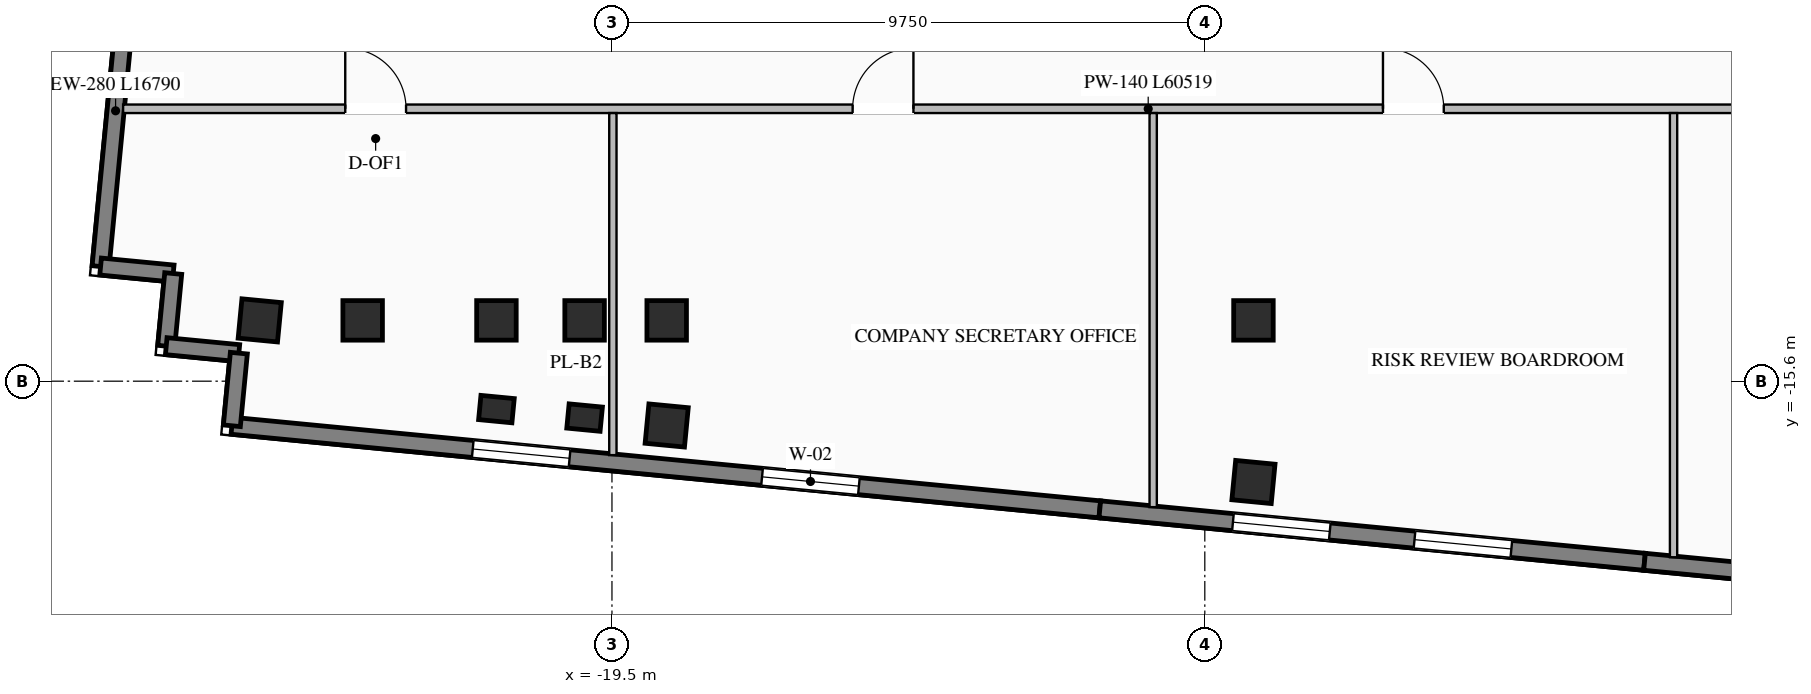
"""IFC4 building model, lengths in metres.
Left out: names, types, materials, properties, quantities, classifications, styles, units other than length and angle.
Written with IfcOpenShell. Run it as: python <this file> out.ifc"""

import sys

from ifc_helpers import new_model, si_unit, direction, frame, frame_2d, origin, origin_2d, place, context, subcontext, project, spatial, rectangle, i_section, extrude, element, fill, save


model = new_model("IFC4")
c1 = context("Model", 3, precision=1e-05, world=origin(), true_north=direction((0.0, 1.0)))
c2 = subcontext(c1, "Body", "Model", "MODEL_VIEW")
j1 = project(units=[si_unit("LENGTHUNIT", "METRE"), si_unit("PLANEANGLEUNIT", "RADIAN")], contexts=[c1])
p1 = place(None, origin())
s1 = spatial("IfcSite", under=j1, at=p1, CompositionType="ELEMENT")
p2 = place(p1, origin())
s2 = spatial("IfcBuilding", under=s1, at=p2, CompositionType="ELEMENT")
p3 = place(p2, frame((0.0, 0.0, 170.75)))
s3 = spatial("IfcBuildingStorey", under=s2, at=p3, CompositionType="ELEMENT", Elevation=170.75)
for number, where, z_axis, x_axis in (
    (1, (-21.4, -14.6, 0.0), (0.0, 0.0, 1.0), (1.0, 0.0, 0.0)),
    (2, (-19.95, -14.6, 0.0), (0.0, 0.0, 1.0), (1.0, 0.0, 0.0)),
    (3, (-18.6, -14.6, 0.0), (0.0, 0.0, 1.0), (1.0, 0.0, 0.0)),
    (4, (-8.95, -14.6, 0.0), (0.0, 0.0, 1.0), (1.0, 0.0, 0.0)),
    (5, (-23.6, -14.6, 0.0), (0.0, 0.0, 1.0), (1.0, 0.0, 0.0)),
    (6, (-18.6, -16.329, 0.0), (0.0, 0.0, 1.0), (0.995, -0.096, 0.0)),
    (7, (-8.95, -17.258, 0.0), (0.0, 0.0, 1.0), (0.995, -0.096, 0.0)),
    (8, (-25.293, -14.6, 0.0), (0.0, 0.0, 1.0), (0.995, -0.096, 0.0)),
):
    element("IfcColumn", number, at=place(p3, frame(where, z_axis=z_axis, x_axis=x_axis)), inside=s3, PredefinedType="COLUMN", context=c2, shape_type="SweptSolid", body=[
        extrude(i_section(OverallWidth=0.65, OverallDepth=0.65, WebThickness=0.028, FlangeThickness=0.04, at=origin_2d()), origin(), (0.0, 0.0, 1.0), 3.45),
    ])
for number, where, z_axis, x_axis in (
    (9, (-21.4, -16.059, 0.0), (0.0, 0.0, 1.0), (0.995, -0.096, 0.0)),
    (10, (-19.95, -16.199, 0.0), (0.0, 0.0, 1.0), (0.995, -0.096, 0.0)),
):
    element("IfcColumn", number, at=place(p3, frame(where, z_axis=z_axis, x_axis=x_axis)), inside=s3, PredefinedType="PILASTER", context=c2, shape_type="SweptSolid", body=[
        extrude(rectangle(XDim=0.55, YDim=0.4, at=origin_2d()), origin(), (0.0, 0.0, 1.0), 3.45),
    ])
p4 = place(p3, frame((-11.477, -17.708, 0.0), z_axis=(0.0, 0.0, 1.0), x_axis=(-0.995395762701, 0.095850276977, 0.0)))
e11 = element("IfcWall", 11, at=p4, inside=s3, PredefinedType="STANDARD", context=c2, shape_type="SweptSolid", body=[
    extrude(rectangle(XDim=14.34, YDim=0.28, at=frame_2d((7.17, 0.0))), origin(), (0.0, 0.0, 1.0), 3.25),
])
p5 = place(p4, frame((3.98, 0.0, 0.76)))
e12 = element("IfcOpeningElement", 12, at=p5, cuts=e11, PredefinedType="OPENING", context=c2, shape_type="SweptSolid", body=[
    extrude(rectangle(XDim=1.6, YDim=1.95, at=frame_2d((0.8, 0.975))), frame((0.0, 0.15, 0.0), z_axis=(0.0, -1.0, 0.0), x_axis=(1.0, 0.0, 0.0)), (0.0, 0.0, 1.0), 0.3),
])
p6 = place(p4, frame((8.76, 0.0, 0.76)))
e13 = element("IfcOpeningElement", 13, at=p6, cuts=e11, PredefinedType="OPENING", context=c2, shape_type="SweptSolid", body=[
    extrude(rectangle(XDim=1.6, YDim=1.95, at=frame_2d((0.8, 0.975))), frame((0.0, 0.15, 0.0), z_axis=(0.0, -1.0, 0.0), x_axis=(1.0, 0.0, 0.0)), (0.0, 0.0, 1.0), 0.3),
])
p7 = place(p3, frame((-2.519, -18.57, 0.0), z_axis=(0.0, 0.0, 1.0), x_axis=(-0.995396794462, 0.09583956164, 0.0)))
e14 = element("IfcWall", 14, at=p7, inside=s3, PredefinedType="STANDARD", context=c2, shape_type="SweptSolid", body=[
    extrude(rectangle(XDim=9.0, YDim=0.28, at=frame_2d((4.5, 0.0))), origin(), (0.0, 0.0, 1.0), 3.25),
])
p8 = place(p7, frame((2.2, 0.0, 0.76)))
e15 = element("IfcOpeningElement", 15, at=p8, cuts=e14, PredefinedType="OPENING", context=c2, shape_type="SweptSolid", body=[
    extrude(rectangle(XDim=1.6, YDim=1.95, at=frame_2d((0.8, 0.975))), frame((0.0, 0.15, 0.0), z_axis=(0.0, -1.0, 0.0), x_axis=(1.0, 0.0, 0.0)), (0.0, 0.0, 1.0), 0.3),
])
p9 = place(p7, frame((5.2, 0.0, 0.76)))
e16 = element("IfcOpeningElement", 16, at=p9, cuts=e14, PredefinedType="OPENING", context=c2, shape_type="SweptSolid", body=[
    extrude(rectangle(XDim=1.6, YDim=1.95, at=frame_2d((0.8, 0.975))), frame((0.0, 0.15, 0.0), z_axis=(0.0, -1.0, 0.0), x_axis=(1.0, 0.0, 0.0)), (0.0, 0.0, 1.0), 0.3),
])
p10 = place(p3, frame((6.44, -19.433, 0.0), z_axis=(0.0, 0.0, 1.0), x_axis=(-0.995396794462, 0.09583956164, 0.0)))
e17 = element("IfcWall", 17, at=p10, inside=s3, PredefinedType="STANDARD", context=c2, shape_type="SweptSolid", body=[
    extrude(rectangle(XDim=9.0, YDim=0.28, at=frame_2d((4.5, 0.0))), origin(), (0.0, 0.0, 1.0), 3.25),
])
p11 = place(p10, frame((2.2, 0.0, 0.76)))
e18 = element("IfcOpeningElement", 18, at=p11, cuts=e17, PredefinedType="OPENING", context=c2, shape_type="SweptSolid", body=[
    extrude(rectangle(XDim=1.6, YDim=1.95, at=frame_2d((0.8, 0.975))), frame((0.0, 0.15, 0.0), z_axis=(0.0, -1.0, 0.0), x_axis=(1.0, 0.0, 0.0)), (0.0, 0.0, 1.0), 0.3),
])
p12 = place(p10, frame((5.2, 0.0, 0.76)))
e19 = element("IfcOpeningElement", 19, at=p12, cuts=e17, PredefinedType="OPENING", context=c2, shape_type="SweptSolid", body=[
    extrude(rectangle(XDim=1.6, YDim=1.95, at=frame_2d((0.8, 0.975))), frame((0.0, 0.15, 0.0), z_axis=(0.0, -1.0, 0.0), x_axis=(1.0, 0.0, 0.0)), (0.0, 0.0, 1.0), 0.3),
])
p13 = place(p3, frame((-27.91, -13.714, 0.0), z_axis=(0.0, 0.0, 1.0), x_axis=(0.095839027265, 0.995396845913, 0.0)))
e20 = element("IfcWall", 20, at=p13, inside=s3, PredefinedType="STANDARD", context=c2, shape_type="SweptSolid", body=[
    extrude(rectangle(XDim=16.79, YDim=0.28, at=frame_2d((8.395, 0.0))), origin(), (0.0, 0.0, 1.0), 3.25),
])
p14 = place(p13, frame((5.147, 0.0, 0.76)))
e21 = element("IfcOpeningElement", 21, at=p14, cuts=e20, PredefinedType="OPENING", context=c2, shape_type="SweptSolid", body=[
    extrude(rectangle(XDim=2.0, YDim=2.05, at=frame_2d((1.0, 1.025))), frame((0.0, 0.15, 0.0), z_axis=(0.0, -1.0, 0.0), x_axis=(1.0, 0.0, 0.0)), (0.0, 0.0, 1.0), 0.3),
])
p15 = place(p13, frame((11.243, 0.0, 0.76)))
e22 = element("IfcOpeningElement", 22, at=p15, cuts=e20, PredefinedType="OPENING", context=c2, shape_type="SweptSolid", body=[
    extrude(rectangle(XDim=2.0, YDim=2.05, at=frame_2d((1.0, 1.025))), frame((0.0, 0.15, 0.0), z_axis=(0.0, -1.0, 0.0), x_axis=(1.0, 0.0, 0.0)), (0.0, 0.0, 1.0), 0.3),
])
p16 = place(p3, frame((-27.91, -13.714, 0.0), z_axis=(0.0, 0.0, 1.0), x_axis=(0.995397091755, -0.095836473879, 0.0)))
e23 = element("IfcWall", 23, at=p16, inside=s3, PredefinedType="STANDARD", context=c2, shape_type="SweptSolid", body=[
    extrude(rectangle(XDim=1.2, YDim=0.28, at=frame_2d((0.6, 0.0))), origin(), (0.0, 0.0, 1.0), 3.25),
])
for number, where, z_axis, x_axis in (
    (24, (-26.716, -13.829, 0.0), (0.0, 0.0, 1.0), (-0.096, -0.995, 0.0)),
    (25, (-26.831, -15.024, 0.0), (0.0, 0.0, 1.0), (0.995, -0.096, 0.0)),
):
    element("IfcWall", number, at=place(p3, frame(where, z_axis=z_axis, x_axis=x_axis)), inside=s3, PredefinedType="STANDARD", context=c2, shape_type="SweptSolid", body=[
        extrude(rectangle(XDim=1.2, YDim=0.28, at=frame_2d((0.6, 0.0))), origin(), (0.0, 0.0, 1.0), 3.25),
    ])
p17 = place(p3, frame((-25.636, -15.139, 0.0), z_axis=(0.0, 0.0, 1.0), x_axis=(-0.096038073607, -0.995377661201, 0.0)))
e26 = element("IfcWall", 26, at=p17, inside=s3, PredefinedType="STANDARD", context=c2, shape_type="SweptSolid", body=[
    extrude(rectangle(XDim=1.2, YDim=0.28, at=frame_2d((0.6, 0.0))), origin(), (0.0, 0.0, 1.0), 3.25),
])
p18 = place(p3, frame((-27.54, -11.12, 0.0), z_axis=(0.0, 0.0, 1.0), x_axis=(1.0, 0.0, 0.0)))
e27 = element("IfcWall", 27, at=p18, inside=s3, PredefinedType="STANDARD", context=c2, shape_type="SweptSolid", body=[
    extrude(rectangle(XDim=60.519, YDim=0.14, at=frame_2d((30.259, 0.0))), origin(), (0.0, 0.0, 1.0), 3.25),
])
p19 = place(p18, frame((34.03, 0.0, 0.0)))
e28 = element("IfcOpeningElement", 28, at=p19, cuts=e27, PredefinedType="OPENING", context=c2, shape_type="SweptSolid", body=[
    extrude(rectangle(XDim=0.92, YDim=2.08, at=frame_2d((0.46, 1.04))), frame((0.0, 0.08, 0.0), z_axis=(0.0, -1.0, 0.0), x_axis=(1.0, 0.0, 0.0)), (0.0, 0.0, 1.0), 0.16),
])
p20 = place(p18, frame((37.53, 0.0, 0.0)))
e29 = element("IfcOpeningElement", 29, at=p20, cuts=e27, PredefinedType="OPENING", context=c2, shape_type="SweptSolid", body=[
    extrude(rectangle(XDim=0.92, YDim=2.08, at=frame_2d((0.46, 1.04))), frame((0.0, 0.08, 0.0), z_axis=(0.0, -1.0, 0.0), x_axis=(1.0, 0.0, 0.0)), (0.0, 0.0, 1.0), 0.16),
])
p21 = place(p18, frame((40.38, 0.0, 0.0)))
e30 = element("IfcOpeningElement", 30, at=p21, cuts=e27, PredefinedType="OPENING", context=c2, shape_type="SweptSolid", body=[
    extrude(rectangle(XDim=0.92, YDim=2.08, at=frame_2d((0.46, 1.04))), frame((0.0, 0.08, 0.0), z_axis=(0.0, -1.0, 0.0), x_axis=(1.0, 0.0, 0.0)), (0.0, 0.0, 1.0), 0.16),
])
p22 = place(p18, frame((3.653, 0.0, 0.0)))
e31 = element("IfcOpeningElement", 31, at=p22, cuts=e27, PredefinedType="OPENING", context=c2, shape_type="SweptSolid", body=[
    extrude(rectangle(XDim=1.0, YDim=2.08, at=frame_2d((0.5, 1.04))), frame((0.0, 0.08, 0.0), z_axis=(0.0, -1.0, 0.0), x_axis=(1.0, 0.0, 0.0)), (0.0, 0.0, 1.0), 0.16),
])
p23 = place(p18, frame((11.998, 0.0, 0.0)))
e32 = element("IfcOpeningElement", 32, at=p23, cuts=e27, PredefinedType="OPENING", context=c2, shape_type="SweptSolid", body=[
    extrude(rectangle(XDim=1.0, YDim=2.08, at=frame_2d((0.5, 1.04))), frame((0.0, 0.08, 0.0), z_axis=(0.0, -1.0, 0.0), x_axis=(1.0, 0.0, 0.0)), (0.0, 0.0, 1.0), 0.16),
])
p24 = place(p18, frame((20.72, 0.0, 0.0)))
e33 = element("IfcOpeningElement", 33, at=p24, cuts=e27, PredefinedType="OPENING", context=c2, shape_type="SweptSolid", body=[
    extrude(rectangle(XDim=1.0, YDim=2.08, at=frame_2d((0.5, 1.04))), frame((0.0, 0.08, 0.0), z_axis=(0.0, -1.0, 0.0), x_axis=(1.0, 0.0, 0.0)), (0.0, 0.0, 1.0), 0.16),
])
p25 = place(p18, frame((28.619, 0.0, 0.0)))
e34 = element("IfcOpeningElement", 34, at=p25, cuts=e27, PredefinedType="OPENING", context=c2, shape_type="SweptSolid", body=[
    extrude(rectangle(XDim=1.0, YDim=2.08, at=frame_2d((0.5, 1.04))), frame((0.0, 0.08, 0.0), z_axis=(0.0, -1.0, 0.0), x_axis=(1.0, 0.0, 0.0)), (0.0, 0.0, 1.0), 0.16),
])
p26 = place(p18, frame((43.754, 0.0, 0.0)))
e35 = element("IfcOpeningElement", 35, at=p26, cuts=e27, PredefinedType="OPENING", context=c2, shape_type="SweptSolid", body=[
    extrude(rectangle(XDim=1.0, YDim=2.08, at=frame_2d((0.5, 1.04))), frame((0.0, 0.08, 0.0), z_axis=(0.0, -1.0, 0.0), x_axis=(1.0, 0.0, 0.0)), (0.0, 0.0, 1.0), 0.16),
])
p27 = place(p18, frame((48.567, 0.0, 0.0)))
e36 = element("IfcOpeningElement", 36, at=p27, cuts=e27, PredefinedType="OPENING", context=c2, shape_type="SweptSolid", body=[
    extrude(rectangle(XDim=1.0, YDim=2.08, at=frame_2d((0.5, 1.04))), frame((0.0, 0.08, 0.0), z_axis=(0.0, -1.0, 0.0), x_axis=(1.0, 0.0, 0.0)), (0.0, 0.0, 1.0), 0.16),
])
p28 = place(p18, frame((53.472, 0.0, 0.0)))
e37 = element("IfcOpeningElement", 37, at=p28, cuts=e27, PredefinedType="OPENING", context=c2, shape_type="SweptSolid", body=[
    extrude(rectangle(XDim=1.0, YDim=2.08, at=frame_2d((0.5, 1.04))), frame((0.0, 0.08, 0.0), z_axis=(0.0, -1.0, 0.0), x_axis=(1.0, 0.0, 0.0)), (0.0, 0.0, 1.0), 0.16),
])
p29 = place(p18, frame((57.823, 0.0, 0.0)))
e38 = element("IfcOpeningElement", 38, at=p29, cuts=e27, PredefinedType="OPENING", context=c2, shape_type="SweptSolid", body=[
    extrude(rectangle(XDim=1.0, YDim=2.08, at=frame_2d((0.5, 1.04))), frame((0.0, 0.08, 0.0), z_axis=(0.0, -1.0, 0.0), x_axis=(1.0, 0.0, 0.0)), (0.0, 0.0, 1.0), 0.16),
])
p30 = place(p3, frame((-19.485, -16.816, 0.0), z_axis=(0.0, 0.0, 1.0), x_axis=(0.0, 1.0, 0.0)))
e39 = element("IfcWall", 39, at=p30, inside=s3, PredefinedType="STANDARD", context=c2, shape_type="SweptSolid", body=[
    extrude(rectangle(XDim=5.626, YDim=0.12, at=frame_2d((2.813, 0.0))), origin(), (0.0, 0.0, 1.0), 3.25),
])
p31 = place(p3, frame((-10.599, -17.672, 0.0), z_axis=(0.0, 0.0, 1.0), x_axis=(0.0, 1.0, 0.0)))
e40 = element("IfcWall", 40, at=p31, inside=s3, PredefinedType="STANDARD", context=c2, shape_type="SweptSolid", body=[
    extrude(rectangle(XDim=6.482, YDim=0.12, at=frame_2d((3.241, 0.0))), origin(), (0.0, 0.0, 1.0), 3.25),
])
p32 = place(p3, frame((-2.041, -18.496, 0.0), z_axis=(0.0, 0.0, 1.0), x_axis=(0.0, 1.0, 0.0)))
e41 = element("IfcWall", 41, at=p32, inside=s3, PredefinedType="STANDARD", context=c2, shape_type="SweptSolid", body=[
    extrude(rectangle(XDim=7.306, YDim=0.12, at=frame_2d((3.653, 0.0))), origin(), (0.0, 0.0, 1.0), 3.25),
])
p33 = place(p5, origin())
e42 = element("IfcWindow", 42, at=p33, inside=s3, PartitioningType="SINGLE_PANEL", PredefinedType="WINDOW", context=c2, shape_type="SweptSolid", body=[
    extrude(rectangle(XDim=1.6, YDim=1.95, at=frame_2d((0.8, 0.975))), frame((0.0, 0.03, 0.0), z_axis=(0.0, -1.0, 0.0), x_axis=(1.0, 0.0, 0.0)), (0.0, 0.0, 1.0), 0.06),
])
fill(e12, e42)
p34 = place(p6, origin())
e43 = element("IfcWindow", 43, at=p34, inside=s3, PartitioningType="SINGLE_PANEL", PredefinedType="WINDOW", context=c2, shape_type="SweptSolid", body=[
    extrude(rectangle(XDim=1.6, YDim=1.95, at=frame_2d((0.8, 0.975))), frame((0.0, 0.03, 0.0), z_axis=(0.0, -1.0, 0.0), x_axis=(1.0, 0.0, 0.0)), (0.0, 0.0, 1.0), 0.06),
])
fill(e13, e43)
p35 = place(p8, origin())
e44 = element("IfcWindow", 44, at=p35, inside=s3, PartitioningType="SINGLE_PANEL", PredefinedType="WINDOW", context=c2, shape_type="SweptSolid", body=[
    extrude(rectangle(XDim=1.6, YDim=1.95, at=frame_2d((0.8, 0.975))), frame((0.0, 0.03, 0.0), z_axis=(0.0, -1.0, 0.0), x_axis=(1.0, 0.0, 0.0)), (0.0, 0.0, 1.0), 0.06),
])
fill(e15, e44)
p36 = place(p9, origin())
e45 = element("IfcWindow", 45, at=p36, inside=s3, PartitioningType="SINGLE_PANEL", PredefinedType="WINDOW", context=c2, shape_type="SweptSolid", body=[
    extrude(rectangle(XDim=1.6, YDim=1.95, at=frame_2d((0.8, 0.975))), frame((0.0, 0.03, 0.0), z_axis=(0.0, -1.0, 0.0), x_axis=(1.0, 0.0, 0.0)), (0.0, 0.0, 1.0), 0.06),
])
fill(e16, e45)
p37 = place(p22, origin())
e46 = element("IfcDoor", 46, at=p37, inside=s3, OperationType="SINGLE_SWING_LEFT", PredefinedType="DOOR", context=c2, shape_type="SweptSolid", body=[
    extrude(rectangle(XDim=1.0, YDim=2.08, at=frame_2d((0.5, 1.04))), frame((0.0, 0.025, 0.0), z_axis=(0.0, -1.0, 0.0), x_axis=(1.0, 0.0, 0.0)), (0.0, 0.0, 1.0), 0.05),
])
fill(e31, e46)
p38 = place(p23, origin())
e47 = element("IfcDoor", 47, at=p38, inside=s3, OperationType="SINGLE_SWING_RIGHT", PredefinedType="DOOR", context=c2, shape_type="SweptSolid", body=[
    extrude(rectangle(XDim=1.0, YDim=2.08, at=frame_2d((0.5, 1.04))), frame((0.0, 0.025, 0.0), z_axis=(0.0, -1.0, 0.0), x_axis=(1.0, 0.0, 0.0)), (0.0, 0.0, 1.0), 0.05),
])
fill(e32, e47)
p39 = place(p24, origin())
e48 = element("IfcDoor", 48, at=p39, inside=s3, OperationType="SINGLE_SWING_LEFT", PredefinedType="DOOR", context=c2, shape_type="SweptSolid", body=[
    extrude(rectangle(XDim=1.0, YDim=2.08, at=frame_2d((0.5, 1.04))), frame((0.0, 0.025, 0.0), z_axis=(0.0, -1.0, 0.0), x_axis=(1.0, 0.0, 0.0)), (0.0, 0.0, 1.0), 0.05),
])
fill(e33, e48)
save(model, sys.argv[1])
